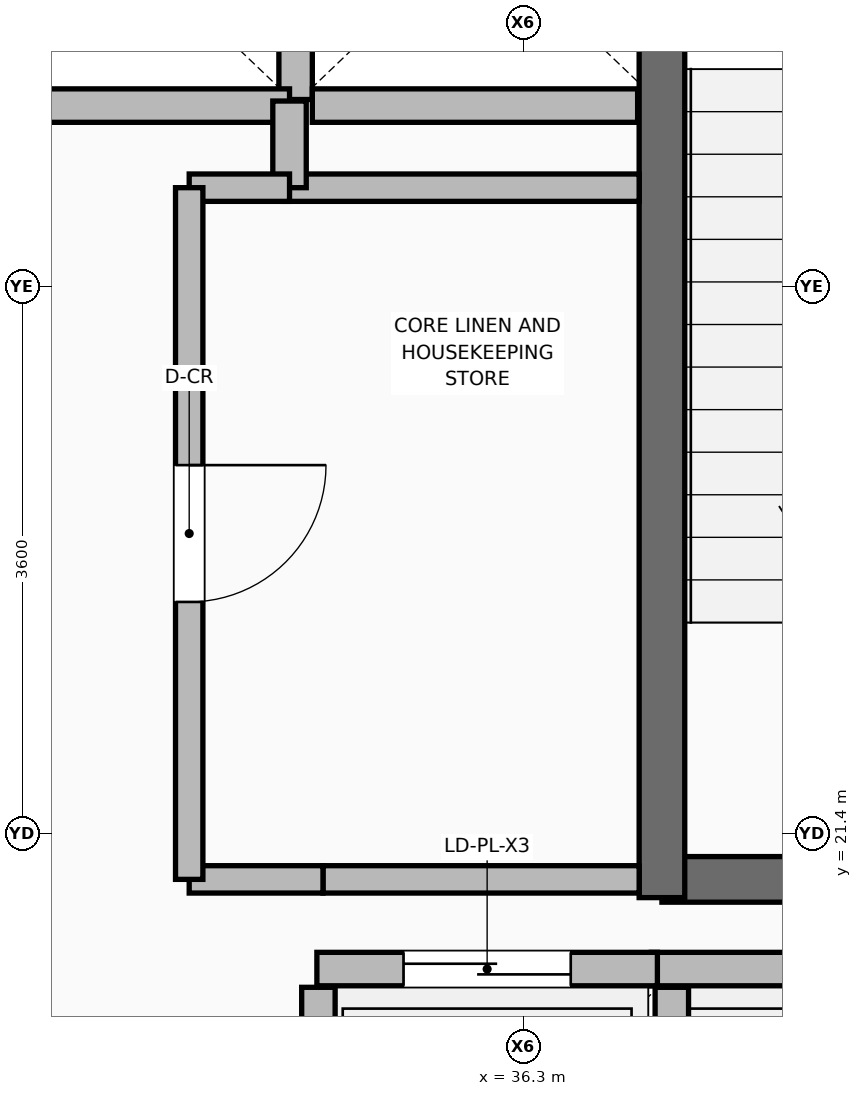
"""IFC4 building model, lengths in metres.
Left out: names, types, materials, properties, quantities, classifications, styles, units other than length and angle.
Written with IfcOpenShell. Run it as: python <this file> out.ifc"""

import sys

from ifc_helpers import new_model, si_unit, direction, frame, frame_2d, origin, place, context, subcontext, project, spatial, rectangle, extrude, element, fill, save


model = new_model("IFC4")
c1 = context("Model", 3, precision=1e-05, world=origin(), true_north=direction((0.0, 1.0)))
c2 = subcontext(c1, "Body", "Model", "MODEL_VIEW")
j1 = project(units=[si_unit("LENGTHUNIT", "METRE"), si_unit("PLANEANGLEUNIT", "RADIAN")], contexts=[c1])
p1 = place(None, origin())
s1 = spatial("IfcSite", under=j1, at=p1, CompositionType="ELEMENT")
p2 = place(p1, origin())
s2 = spatial("IfcBuilding", under=s1, at=p2, CompositionType="ELEMENT")
p3 = place(p2, frame((0.0, 0.0, 290.1)))
s3 = spatial("IfcBuildingStorey", under=s2, at=p3, CompositionType="ELEMENT", Elevation=290.1)
p4 = place(p3, frame((34.95, 17.92, 0.0), z_axis=(0.0, 0.0, 1.0), x_axis=(0.0, 1.0, 0.0)))
e1 = element("IfcWall", 1, at=p4, inside=s3, PredefinedType="PARTITIONING", context=c2, shape_type="SweptSolid", body=[
    extrude(rectangle(XDim=2.47, YDim=0.22, at=frame_2d((1.235, 0.0))), origin(), (0.0, 0.0, 1.0), 4.595),
])
p5 = place(p3, frame((37.275, 18.08, 0.0), z_axis=(0.0, 0.0, 1.0), x_axis=(0.0, 1.0, 0.0)))
e2 = element("IfcWall", 2, at=p5, inside=s3, PredefinedType="PARTITIONING", context=c2, shape_type="SweptSolid", body=[
    extrude(rectangle(XDim=2.31, YDim=0.22, at=frame_2d((1.155, 0.0))), origin(), (0.0, 0.0, 1.0), 4.595),
])
p6 = place(p3, frame((34.8, 26.23, 0.0), z_axis=(0.0, 0.0, 1.0), x_axis=(0.0, 1.0, 0.0)))
e3 = element("IfcWall", 3, at=p6, inside=s3, PredefinedType="PARTITIONING", context=c2, shape_type="SweptSolid", body=[
    extrude(rectangle(XDim=2.21, YDim=0.22, at=frame_2d((1.105, 0.0))), origin(), (0.0, 0.0, 1.0), 4.595),
])
p7 = place(p3, frame((34.91, 26.19, 0.0), z_axis=(0.0, 0.0, 1.0), x_axis=(1.0, 0.0, 0.0)))
e4 = element("IfcWall", 4, at=p7, inside=s3, PredefinedType="PARTITIONING", context=c2, shape_type="SweptSolid", body=[
    extrude(rectangle(XDim=2.14, YDim=0.22, at=frame_2d((1.07, 0.0))), origin(), (0.0, 0.0, 1.0), 4.595),
])
p8 = place(p3, frame((37.21, 21.1, 0.0), z_axis=(0.0, 0.0, 1.0), x_axis=(1.0, 0.0, 0.0)))
e5 = element("IfcWall", 5, at=p8, inside=s3, PredefinedType="SHEAR", context=c2, shape_type="SweptSolid", body=[
    extrude(rectangle(XDim=3.715, YDim=0.3, at=frame_2d((1.857, 0.0))), origin(), (0.0, 0.0, 1.0), 4.62),
])
p9 = place(p3, frame((37.21, 20.98, 0.0), z_axis=(0.0, 0.0, 1.0), x_axis=(0.0, 1.0, 0.0)))
e6 = element("IfcWall", 6, at=p9, inside=s3, PredefinedType="SHEAR", context=c2, shape_type="SweptSolid", body=[
    extrude(rectangle(XDim=7.99, YDim=0.3, at=frame_2d((3.995, 0.0))), origin(), (0.0, 0.0, 1.0), 4.62),
])
p10 = place(p3, frame((37.14, 20.51, 0.0), z_axis=(0.0, 0.0, 1.0), x_axis=(1.0, 0.0, 0.0)))
e7 = element("IfcWall", 7, at=p10, inside=s3, PredefinedType="PARTITIONING", context=c2, shape_type="SweptSolid", body=[
    extrude(rectangle(XDim=2.24, YDim=0.22, at=frame_2d((1.12, 0.0))), origin(), (0.0, 0.0, 1.0), 4.6),
])
p11 = place(p3, frame((34.94, 20.51, 0.0), z_axis=(0.0, 0.0, 1.0), x_axis=(1.0, 0.0, 0.0)))
e8 = element("IfcWall", 8, at=p11, inside=s3, PredefinedType="PARTITIONING", context=c2, shape_type="SweptSolid", body=[
    extrude(rectangle(XDim=2.24, YDim=0.22, at=frame_2d((1.12, 0.0))), origin(), (0.0, 0.0, 1.0), 4.6),
])
p12 = place(p11, frame((0.57, 0.0, 0.0)))
e9 = element("IfcOpeningElement", 9, at=p12, cuts=e8, PredefinedType="OPENING", context=c2, shape_type="SweptSolid", body=[
    extrude(rectangle(XDim=1.1, YDim=2.2, at=frame_2d((0.55, 1.1))), frame((0.0, 0.12, 0.0), z_axis=(0.0, -1.0, 0.0), x_axis=(1.0, 0.0, 0.0)), (0.0, 0.0, 1.0), 0.24),
])
p13 = place(p3, frame((32.44, 26.19, 0.0), z_axis=(0.0, 0.0, 1.0), x_axis=(1.0, 0.0, 0.0)))
e10 = element("IfcWall", 10, at=p13, inside=s3, PredefinedType="PARTITIONING", context=c2, shape_type="SweptSolid", body=[
    extrude(rectangle(XDim=2.32, YDim=0.22, at=frame_2d((1.16, 0.0))), origin(), (0.0, 0.0, 1.0), 4.6),
])
p14 = place(p3, frame((34.98, 21.1, 0.0), z_axis=(0.0, 0.0, 1.0), x_axis=(1.0, 0.0, 0.0)))
e11 = element("IfcWall", 11, at=p14, inside=s3, PredefinedType="PARTITIONING", context=c2, shape_type="SweptSolid", body=[
    extrude(rectangle(XDim=2.08, YDim=0.18, at=frame_2d((1.04, 0.0))), origin(), (0.0, 0.0, 1.0), 4.6),
])
p15 = place(p3, frame((34.72, 25.65, 0.0), z_axis=(0.0, 0.0, 1.0), x_axis=(1.0, 0.0, 0.0)))
e12 = element("IfcWall", 12, at=p15, inside=s3, PredefinedType="PARTITIONING", context=c2, shape_type="SweptSolid", body=[
    extrude(rectangle(XDim=2.34, YDim=0.18, at=frame_2d((1.17, 0.0))), origin(), (0.0, 0.0, 1.0), 4.6),
])
p16 = place(p3, frame((34.76, 25.65, 0.0), z_axis=(0.0, 0.0, 1.0), x_axis=(0.0, 1.0, 0.0)))
e13 = element("IfcWall", 13, at=p16, inside=s3, PredefinedType="PARTITIONING", context=c2, shape_type="SweptSolid", body=[
    extrude(rectangle(XDim=0.57, YDim=0.22, at=frame_2d((0.285, 0.0))), origin(), (0.0, 0.0, 1.0), 4.6),
])
p17 = place(p3, frame((34.1, 21.1, 0.0), z_axis=(0.0, 0.0, 1.0), x_axis=(1.0, 0.0, 0.0)))
e14 = element("IfcWall", 14, at=p17, inside=s3, PredefinedType="PARTITIONING", context=c2, shape_type="SweptSolid", body=[
    extrude(rectangle(XDim=0.88, YDim=0.18, at=frame_2d((0.44, 0.0))), origin(), (0.0, 0.0, 1.0), 4.6),
])
p18 = place(p3, frame((34.1, 25.65, 0.0), z_axis=(0.0, 0.0, 1.0), x_axis=(1.0, 0.0, 0.0)))
e15 = element("IfcWall", 15, at=p18, inside=s3, PredefinedType="PARTITIONING", context=c2, shape_type="SweptSolid", body=[
    extrude(rectangle(XDim=0.66, YDim=0.18, at=frame_2d((0.33, 0.0))), origin(), (0.0, 0.0, 1.0), 4.6),
])
p19 = place(p3, frame((34.1, 21.1, 0.0), z_axis=(0.0, 0.0, 1.0), x_axis=(0.0, 1.0, 0.0)))
e16 = element("IfcWall", 16, at=p19, inside=s3, PredefinedType="PARTITIONING", context=c2, shape_type="SweptSolid", body=[
    extrude(rectangle(XDim=4.55, YDim=0.18, at=frame_2d((2.275, 0.0))), origin(), (0.0, 0.0, 1.0), 4.6),
])
p20 = place(p19, frame((1.825, 0.0, 0.0)))
e17 = element("IfcOpeningElement", 17, at=p20, cuts=e16, PredefinedType="OPENING", context=c2, shape_type="SweptSolid", body=[
    extrude(rectangle(XDim=0.9, YDim=2.1, at=frame_2d((0.45, 1.05))), frame((0.0, 0.1, 0.0), z_axis=(0.0, -1.0, 0.0), x_axis=(1.0, 0.0, 0.0)), (0.0, 0.0, 1.0), 0.2),
])
p21 = place(p12, origin())
e18 = element("IfcDoor", 18, at=p21, inside=s3, OperationType="DOUBLE_DOOR_SLIDING", PredefinedType="DOOR", context=c2, shape_type="SweptSolid", body=[
    extrude(rectangle(XDim=1.1, YDim=2.2, at=frame_2d((0.55, 1.1))), frame((0.0, 0.025, 0.0), z_axis=(0.0, -1.0, 0.0), x_axis=(1.0, 0.0, 0.0)), (0.0, 0.0, 1.0), 0.05),
])
fill(e9, e18)
p22 = place(p20, frame((0.9, 0.0, 0.0), z_axis=(0.0, 0.0, 1.0), x_axis=(-1.0, 0.0, 0.0)))
e19 = element("IfcDoor", 19, at=p22, inside=s3, OperationType="SINGLE_SWING_LEFT", PredefinedType="DOOR", context=c2, shape_type="SweptSolid", body=[
    extrude(rectangle(XDim=0.9, YDim=2.1, at=frame_2d((0.45, 1.05))), frame((0.0, 0.025, 0.0), z_axis=(0.0, -1.0, 0.0), x_axis=(1.0, 0.0, 0.0)), (0.0, 0.0, 1.0), 0.05),
])
fill(e17, e19)
save(model, sys.argv[1])
